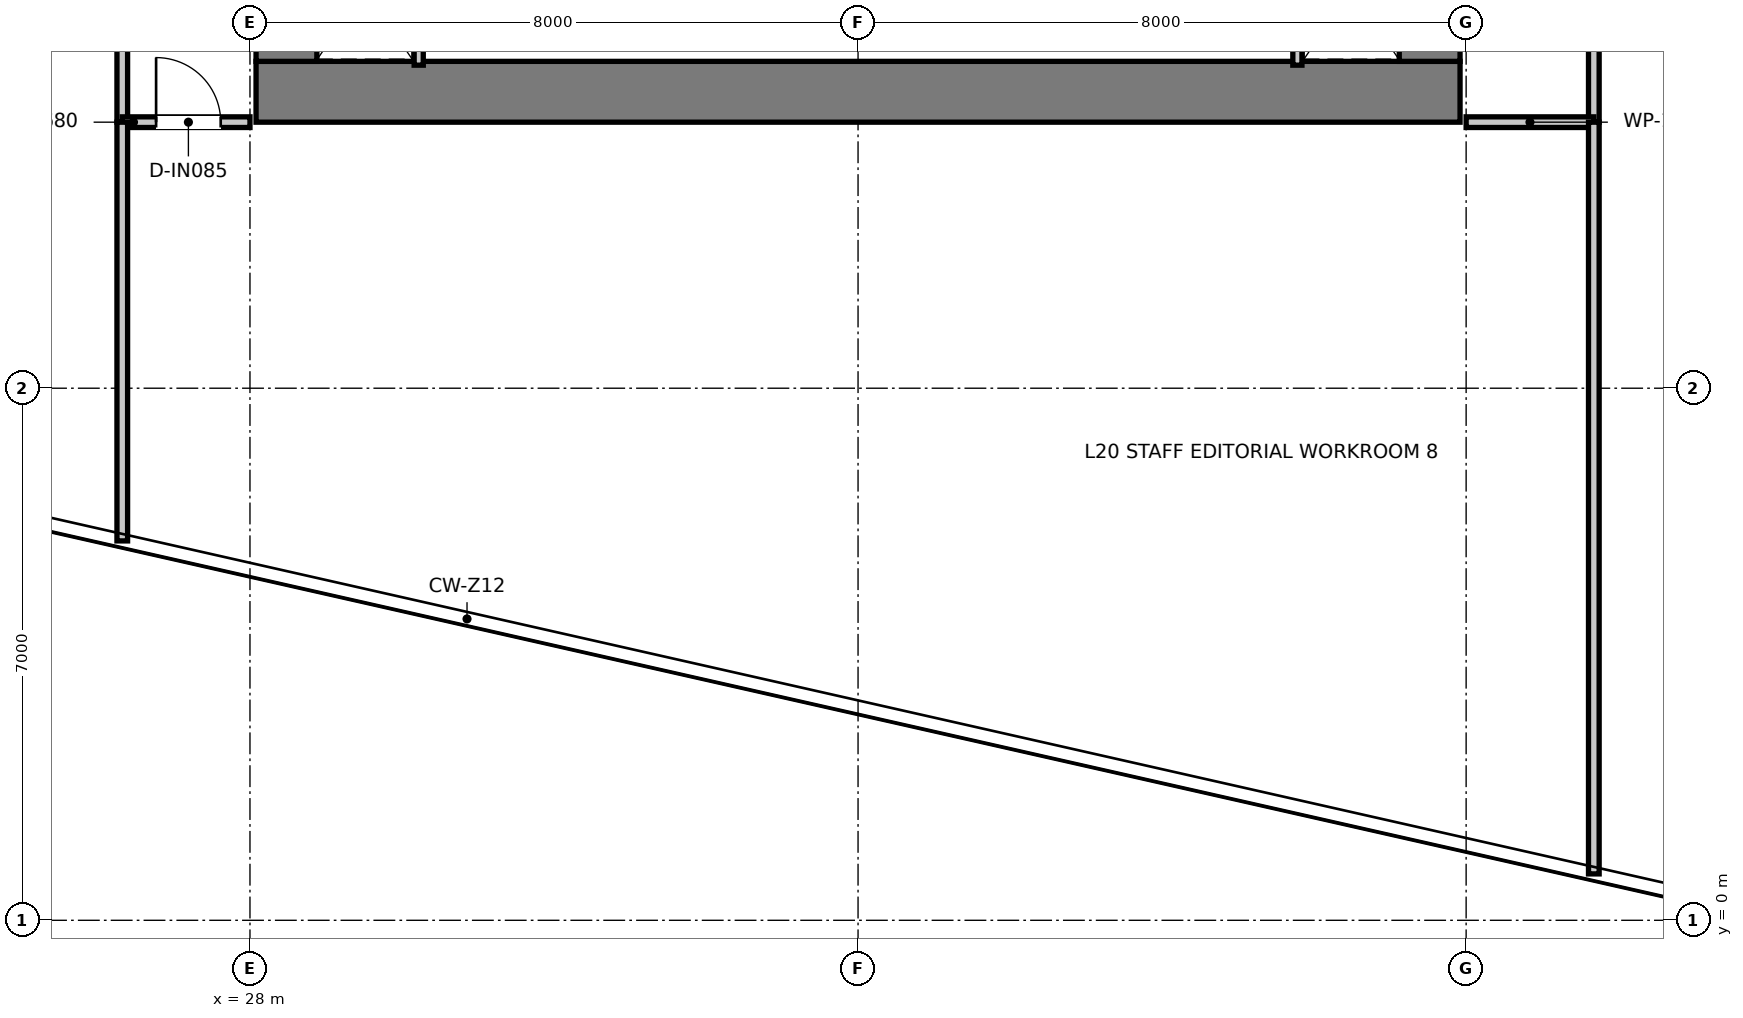
"""IFC4 building model, lengths in metres.
Left out: names, types, materials, properties, quantities, classifications, styles, units other than length and angle.
Written with IfcOpenShell. Run it as: python <this file> out.ifc"""

import sys

from ifc_helpers import new_model, si_unit, direction, frame, frame_2d, origin, place, context, subcontext, project, spatial, rectangle, extrude, element, fill, save


model = new_model("IFC4")
c1 = context("Model", 3, precision=1e-05, world=origin(), true_north=direction((0.0, 1.0)))
c2 = subcontext(c1, "Body", "Model", "MODEL_VIEW")
j1 = project(units=[si_unit("LENGTHUNIT", "METRE"), si_unit("PLANEANGLEUNIT", "RADIAN")], contexts=[c1])
p1 = place(None, origin())
s1 = spatial("IfcSite", under=j1, at=p1, CompositionType="ELEMENT")
p2 = place(p1, origin())
s2 = spatial("IfcBuilding", under=s1, at=p2, CompositionType="ELEMENT")
p3 = place(p2, frame((0.0, 0.0, 86.1)))
s3 = spatial("IfcBuildingStorey", under=s2, at=p3, CompositionType="ELEMENT", Elevation=86.1)
p4 = place(p3, frame((28.08, 10.9, 0.0), z_axis=(0.0, 0.0, 1.0), x_axis=(1.0, 0.0, 0.0)))
e1 = element("IfcWall", 1, at=p4, inside=s3, PredefinedType="SHEAR", context=c2, shape_type="SweptSolid", body=[
    extrude(rectangle(XDim=15.84, YDim=0.8, at=frame_2d((7.92, 0.0))), origin(), (0.0, 0.0, 1.0), 3.95),
])
for number, where, z_axis, x_axis in (
    (2, (28.48, 11.3, 0.0), (0.0, 0.0, 1.0), (0.0, 1.0, 0.0)),
    (3, (43.52, 11.3, 0.0), (0.0, 0.0, 1.0), (0.0, 1.0, 0.0)),
):
    element("IfcWall", number, at=place(p3, frame(where, z_axis=z_axis, x_axis=x_axis)), inside=s3, PredefinedType="SHEAR", context=c2, shape_type="SweptSolid", body=[
        extrude(rectangle(XDim=14.7, YDim=0.8, at=frame_2d((7.35, 0.0))), origin(), (0.0, 0.0, 1.0), 3.95),
    ])
for number, where, z_axis, x_axis in (
    (4, (30.22, 11.25, 0.0), (0.0, 0.0, 1.0), (0.0, 1.0, 0.0)),
    (5, (41.78, 11.25, 0.0), (0.0, 0.0, 1.0), (0.0, 1.0, 0.0)),
):
    element("IfcWall", number, at=place(p3, frame(where, z_axis=z_axis, x_axis=x_axis)), inside=s3, PredefinedType="PARTITIONING", context=c2, shape_type="SweptSolid", body=[
        extrude(rectangle(XDim=1.97, YDim=0.12, at=frame_2d((0.985, 0.0))), origin(), (0.0, 0.0, 1.0), 3.67),
    ])
p5 = place(p3, frame((26.32, 10.5, 0.0), z_axis=(0.0, 0.0, 1.0), x_axis=(0.0, 1.0, 0.0)))
e6 = element("IfcWall", 6, at=p5, inside=s3, PredefinedType="PARTITIONING", context=c2, shape_type="SweptSolid", body=[
    extrude(rectangle(XDim=25.62, YDim=0.14, at=frame_2d((12.81, 0.0))), origin(), (0.0, 0.0, 1.0), 2.97),
])
p6 = place(p5, frame((8.025, 0.0, 0.0)))
e7 = element("IfcOpeningElement", 7, at=p6, cuts=e6, PredefinedType="OPENING", context=c2, shape_type="SweptSolid", body=[
    extrude(rectangle(XDim=0.95, YDim=2.1, at=frame_2d((0.475, 1.05))), frame((0.0, 0.08, 0.0), z_axis=(0.0, -1.0, 0.0), x_axis=(1.0, 0.0, 0.0)), (0.0, 0.0, 1.0), 0.16),
])
p7 = place(p5, frame((13.025, 0.0, 0.0)))
e8 = element("IfcOpeningElement", 8, at=p7, cuts=e6, PredefinedType="OPENING", context=c2, shape_type="SweptSolid", body=[
    extrude(rectangle(XDim=0.95, YDim=2.1, at=frame_2d((0.475, 1.05))), frame((0.0, 0.08, 0.0), z_axis=(0.0, -1.0, 0.0), x_axis=(1.0, 0.0, 0.0)), (0.0, 0.0, 1.0), 0.16),
])
p8 = place(p5, frame((20.125, 0.0, 0.0)))
e9 = element("IfcOpeningElement", 9, at=p8, cuts=e6, PredefinedType="OPENING", context=c2, shape_type="SweptSolid", body=[
    extrude(rectangle(XDim=0.95, YDim=2.1, at=frame_2d((0.475, 1.05))), frame((0.0, 0.08, 0.0), z_axis=(0.0, -1.0, 0.0), x_axis=(1.0, 0.0, 0.0)), (0.0, 0.0, 1.0), 0.16),
])
p9 = place(p3, frame((45.68, 10.5, 0.0), z_axis=(0.0, 0.0, 1.0), x_axis=(0.0, 1.0, 0.0)))
e10 = element("IfcWall", 10, at=p9, inside=s3, PredefinedType="PARTITIONING", context=c2, shape_type="SweptSolid", body=[
    extrude(rectangle(XDim=25.62, YDim=0.14, at=frame_2d((12.81, 0.0))), origin(), (0.0, 0.0, 1.0), 2.97),
])
p10 = place(p9, frame((15.125, 0.0, 0.0)))
e11 = element("IfcOpeningElement", 11, at=p10, cuts=e10, PredefinedType="OPENING", context=c2, shape_type="SweptSolid", body=[
    extrude(rectangle(XDim=0.95, YDim=2.1, at=frame_2d((0.475, 1.05))), frame((0.0, 0.08, 0.0), z_axis=(0.0, -1.0, 0.0), x_axis=(1.0, 0.0, 0.0)), (0.0, 0.0, 1.0), 0.16),
])
p11 = place(p3, frame((26.32, 10.5, 0.0), z_axis=(0.0, 0.0, 1.0), x_axis=(1.0, 0.0, 0.0)))
e12 = element("IfcWall", 12, at=p11, inside=s3, PredefinedType="PARTITIONING", context=c2, shape_type="SweptSolid", body=[
    extrude(rectangle(XDim=1.68, YDim=0.14, at=frame_2d((0.84, 0.0))), origin(), (0.0, 0.0, 1.0), 3.67),
])
p12 = place(p11, frame((0.445, 0.0, 0.0)))
e13 = element("IfcOpeningElement", 13, at=p12, cuts=e12, PredefinedType="OPENING", context=c2, shape_type="SweptSolid", body=[
    extrude(rectangle(XDim=0.85, YDim=2.1, at=frame_2d((0.425, 1.05))), frame((0.0, 0.08, 0.0), z_axis=(0.0, -1.0, 0.0), x_axis=(1.0, 0.0, 0.0)), (0.0, 0.0, 1.0), 0.16),
])
p13 = place(p3, frame((44.0, 10.5, 0.0), z_axis=(0.0, 0.0, 1.0), x_axis=(1.0, 0.0, 0.0)))
e14 = element("IfcWall", 14, at=p13, inside=s3, PredefinedType="PARTITIONING", context=c2, shape_type="SweptSolid", body=[
    extrude(rectangle(XDim=1.68, YDim=0.14, at=frame_2d((0.84, 0.0))), origin(), (0.0, 0.0, 1.0), 3.67),
])
p14 = place(p3, frame((26.32, 4.991, 0.0), z_axis=(0.0, 0.0, 1.0), x_axis=(0.0, 1.0, 0.0)))
e15 = element("IfcWall", 15, at=p14, inside=s3, PredefinedType="PARTITIONING", context=c2, shape_type="SweptSolid", body=[
    extrude(rectangle(XDim=5.509, YDim=0.14, at=frame_2d((2.754, 0.0))), origin(), (0.0, 0.0, 1.0), 3.67),
])
p15 = place(p3, frame((45.68, 0.61, 0.0), z_axis=(0.0, 0.0, 1.0), x_axis=(0.0, 1.0, 0.0)))
e16 = element("IfcWall", 16, at=p15, inside=s3, PredefinedType="PARTITIONING", context=c2, shape_type="SweptSolid", body=[
    extrude(rectangle(XDim=9.89, YDim=0.14, at=frame_2d((4.945, 0.0))), origin(), (0.0, 0.0, 1.0), 3.67),
])
p16 = place(p12, origin())
e17 = element("IfcDoor", 17, at=p16, inside=s3, OperationType="SINGLE_SWING_LEFT", PredefinedType="DOOR", context=c2, shape_type="SweptSolid", body=[
    extrude(rectangle(XDim=0.85, YDim=2.1, at=frame_2d((0.425, 1.05))), frame((0.0, 0.025, 0.0), z_axis=(0.0, -1.0, 0.0), x_axis=(1.0, 0.0, 0.0)), (0.0, 0.0, 1.0), 0.05),
])
fill(e13, e17)
save(model, sys.argv[1])
